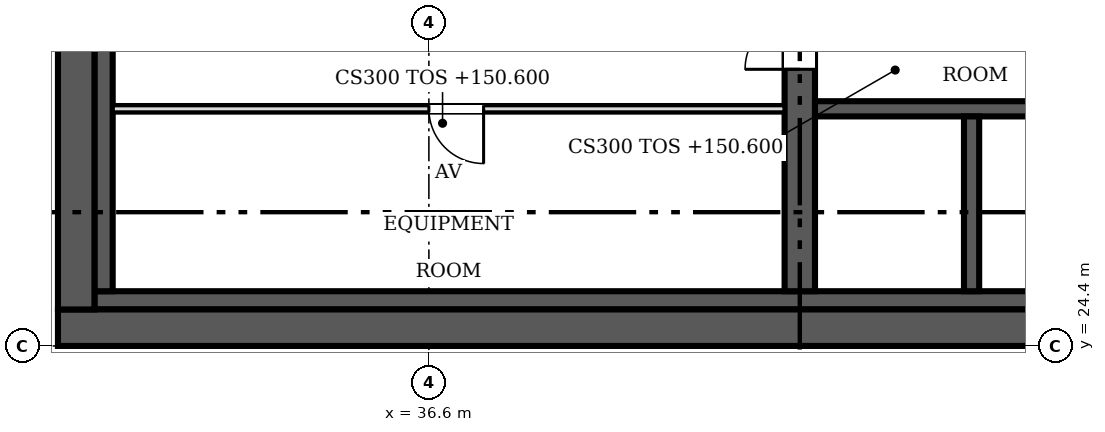
"""IFC4 building model, lengths in metres.
Left out: names, types, materials, properties, quantities, classifications, styles, units other than length and angle.
Written with IfcOpenShell. Run it as: python <this file> out.ifc"""

import sys

from ifc_helpers import new_model, si_unit, direction, frame, frame_2d, origin, place, context, subcontext, project, spatial, rectangle, extrude, source, transform, mapped, element, fill, save


model = new_model("IFC4")
c1 = context("Model", 3, precision=1e-05, world=origin(), true_north=direction((0.0, 1.0)))
c2 = subcontext(c1, "Body", "Model", "MODEL_VIEW")
j1 = project(units=[si_unit("LENGTHUNIT", "METRE"), si_unit("PLANEANGLEUNIT", "RADIAN")], contexts=[c1])
p1 = place(None, origin())
s1 = spatial("IfcSite", under=j1, at=p1, CompositionType="ELEMENT")
p2 = place(p1, origin())
s2 = spatial("IfcBuilding", under=s1, at=p2, CompositionType="ELEMENT")
p3 = place(p2, frame((0.0, 0.0, 150.6)))
s3 = spatial("IfcBuildingStorey", under=s2, at=p3, CompositionType="ELEMENT", Elevation=150.6)
p4 = place(p3, frame((54.9, 24.7, 0.0), z_axis=(0.0, 0.0, 1.0), x_axis=(-1.0, 0.0, 0.0)))
e1 = element("IfcWall", 1, at=p4, inside=s3, PredefinedType="SHEAR", context=c2, shape_type="SweptSolid", body=[
    extrude(rectangle(XDim=24.4, YDim=0.6, at=frame_2d((12.2, 0.0))), origin(), (0.0, 0.0, 1.0), 4.8),
])
m1 = source(origin(), c2, "Body", "SweptSolid", [
    extrude(rectangle(XDim=1.2, YDim=2.1, at=frame_2d((0.6, 1.05))), frame((0.0, 0.31, 0.0), z_axis=(0.0, -1.0, 0.0), x_axis=(1.0, 0.0, 0.0)), (0.0, 0.0, 1.0), 0.62),
])
p5 = place(p4, frame((1.5, 0.0, 0.0)))
e2 = element("IfcOpeningElement", 2, at=p5, cuts=e1, PredefinedType="OPENING", context=c2, shape_type="MappedRepresentation", body=[
    mapped(m1, transform((0.0, 0.0, 0.0), scale=1.0)),
])
p6 = place(p3, frame((30.8, 25.0, 0.0), z_axis=(0.0, 0.0, 1.0), x_axis=(0.0, 1.0, 0.0)))
e3 = element("IfcWall", 3, at=p6, inside=s3, PredefinedType="SHEAR", context=c2, shape_type="SweptSolid", body=[
    extrude(rectangle(XDim=23.2, YDim=0.6, at=frame_2d((11.6, 0.0))), origin(), (0.0, 0.0, 1.0), 4.8),
])
m2 = source(origin(), c2, "Body", "SweptSolid", [
    extrude(rectangle(XDim=2.1, YDim=2.4, at=frame_2d((1.05, 1.2))), frame((0.0, 0.31, 0.0), z_axis=(0.0, -1.0, 0.0), x_axis=(1.0, 0.0, 0.0)), (0.0, 0.0, 1.0), 0.62),
])
p7 = place(p6, frame((4.8, 0.0, 0.0)))
e4 = element("IfcOpeningElement", 4, at=p7, cuts=e3, PredefinedType="OPENING", context=c2, shape_type="MappedRepresentation", body=[
    mapped(m2, transform((0.0, 0.0, 0.0), scale=1.0)),
])
p8 = place(p6, frame((16.3, 0.0, 0.0)))
e5 = element("IfcOpeningElement", 5, at=p8, cuts=e3, PredefinedType="OPENING", context=c2, shape_type="MappedRepresentation", body=[
    mapped(m2, transform((0.0, 0.0, 0.0), scale=1.0)),
])
p9 = place(p3, frame((31.1, 25.15, 0.0), z_axis=(0.0, 0.0, 1.0), x_axis=(1.0, 0.0, 0.0)))
e6 = element("IfcWall", 6, at=p9, inside=s3, PredefinedType="SOLIDWALL", context=c2, shape_type="SweptSolid", body=[
    extrude(rectangle(XDim=21.1, YDim=0.3, at=frame_2d((10.55, 0.0))), origin(), (0.0, 0.0, 1.0), 4.8),
])
p10 = place(p3, frame((31.25, 25.3, 0.0), z_axis=(0.0, 0.0, 1.0), x_axis=(0.0, 1.0, 0.0)))
e7 = element("IfcWall", 7, at=p10, inside=s3, PredefinedType="SOLIDWALL", context=c2, shape_type="SweptSolid", body=[
    extrude(rectangle(XDim=4.5, YDim=0.3, at=frame_2d((2.25, 0.0))), origin(), (0.0, 0.0, 1.0), 4.8),
])
p11 = place(p3, frame((42.7, 36.35, 0.0), z_axis=(0.0, 0.0, 1.0), x_axis=(0.0, -1.0, 0.0)))
e8 = element("IfcWall", 8, at=p11, inside=s3, PredefinedType="SHEAR", context=c2, shape_type="SweptSolid", body=[
    extrude(rectangle(XDim=11.05, YDim=0.5, at=frame_2d((5.525, 0.0))), origin(), (0.0, 0.0, 1.0), 4.8),
])
m3 = source(origin(), c2, "Body", "SweptSolid", [
    extrude(rectangle(XDim=0.9, YDim=2.1, at=frame_2d((0.45, 1.05))), frame((0.0, 0.26, 0.0), z_axis=(0.0, -1.0, 0.0), x_axis=(1.0, 0.0, 0.0)), (0.0, 0.0, 1.0), 0.52),
])
p12 = place(p11, frame((6.5, 0.0, 0.0)))
e9 = element("IfcOpeningElement", 9, at=p12, cuts=e8, PredefinedType="OPENING", context=c2, shape_type="MappedRepresentation", body=[
    mapped(m3, transform((0.0, 0.0, 0.0), scale=1.0)),
])
m4 = source(origin(), c2, "Body", "SweptSolid", [
    extrude(rectangle(XDim=1.1, YDim=2.1, at=frame_2d((0.55, 1.05))), frame((0.0, 0.26, 0.0), z_axis=(0.0, -1.0, 0.0), x_axis=(1.0, 0.0, 0.0)), (0.0, 0.0, 1.0), 0.52),
])
p13 = place(p11, frame((3.8, 0.0, 0.0)))
e10 = element("IfcOpeningElement", 10, at=p13, cuts=e8, PredefinedType="OPENING", context=c2, shape_type="MappedRepresentation", body=[
    mapped(m4, transform((0.0, 0.0, 0.0), scale=1.0)),
])
p14 = place(p3, frame((42.95, 28.3, 0.0), z_axis=(0.0, 0.0, 1.0), x_axis=(1.0, 0.0, 0.0)))
e11 = element("IfcWall", 11, at=p14, inside=s3, PredefinedType="SOLIDWALL", context=c2, shape_type="SweptSolid", body=[
    extrude(rectangle(XDim=5.275, YDim=0.25, at=frame_2d((2.638, 0.0))), origin(), (0.0, 0.0, 1.0), 4.8),
])
p15 = place(p3, frame((45.525, 25.3, 0.0), z_axis=(0.0, 0.0, 1.0), x_axis=(0.0, 1.0, 0.0)))
e12 = element("IfcWall", 12, at=p15, inside=s3, PredefinedType="SOLIDWALL", context=c2, shape_type="SweptSolid", body=[
    extrude(rectangle(XDim=2.875, YDim=0.25, at=frame_2d((1.438, 0.0))), origin(), (0.0, 0.0, 1.0), 4.8),
])
p16 = place(p3, frame((42.45, 28.3, 0.0), z_axis=(0.0, 0.0, 1.0), x_axis=(-1.0, 0.0, 0.0)))
e13 = element("IfcWall", 13, at=p16, inside=s3, PredefinedType="PARTITIONING", context=c2, shape_type="SweptSolid", body=[
    extrude(rectangle(XDim=11.05, YDim=0.12, at=frame_2d((5.525, 0.0))), origin(), (0.0, 0.0, 1.0), 4.6),
])
m5 = source(origin(), c2, "Body", "SweptSolid", [
    extrude(rectangle(XDim=0.9, YDim=2.1, at=frame_2d((0.45, 1.05))), frame((0.0, 0.07, 0.0), z_axis=(0.0, -1.0, 0.0), x_axis=(1.0, 0.0, 0.0)), (0.0, 0.0, 1.0), 0.14),
])
p17 = place(p16, frame((4.95, 0.0, 0.0)))
e14 = element("IfcOpeningElement", 14, at=p17, cuts=e13, PredefinedType="OPENING", context=c2, shape_type="MappedRepresentation", body=[
    mapped(m5, transform((0.0, 0.0, 0.0), scale=1.0)),
])
m6 = source(origin(), c2, "Body", "SweptSolid", [
    extrude(rectangle(XDim=0.9, YDim=2.1, at=frame_2d((0.45, 1.05))), frame((0.0, 0.025, 0.0), z_axis=(0.0, -1.0, 0.0), x_axis=(1.0, 0.0, 0.0)), (0.0, 0.0, 1.0), 0.05),
])
p18 = place(p12, origin())
e15 = element("IfcDoor", 15, at=p18, inside=s3, OperationType="SINGLE_SWING_RIGHT", PredefinedType="DOOR", context=c2, shape_type="MappedRepresentation", body=[
    mapped(m6, transform((0.0, 0.0, 0.0), scale=1.0)),
])
fill(e9, e15)
p19 = place(p17, origin())
e16 = element("IfcDoor", 16, at=p19, inside=s3, OperationType="SINGLE_SWING_LEFT", PredefinedType="DOOR", context=c2, shape_type="MappedRepresentation", body=[
    mapped(m6, transform((0.0, 0.0, 0.0), scale=1.0)),
])
fill(e14, e16)
save(model, sys.argv[1])
